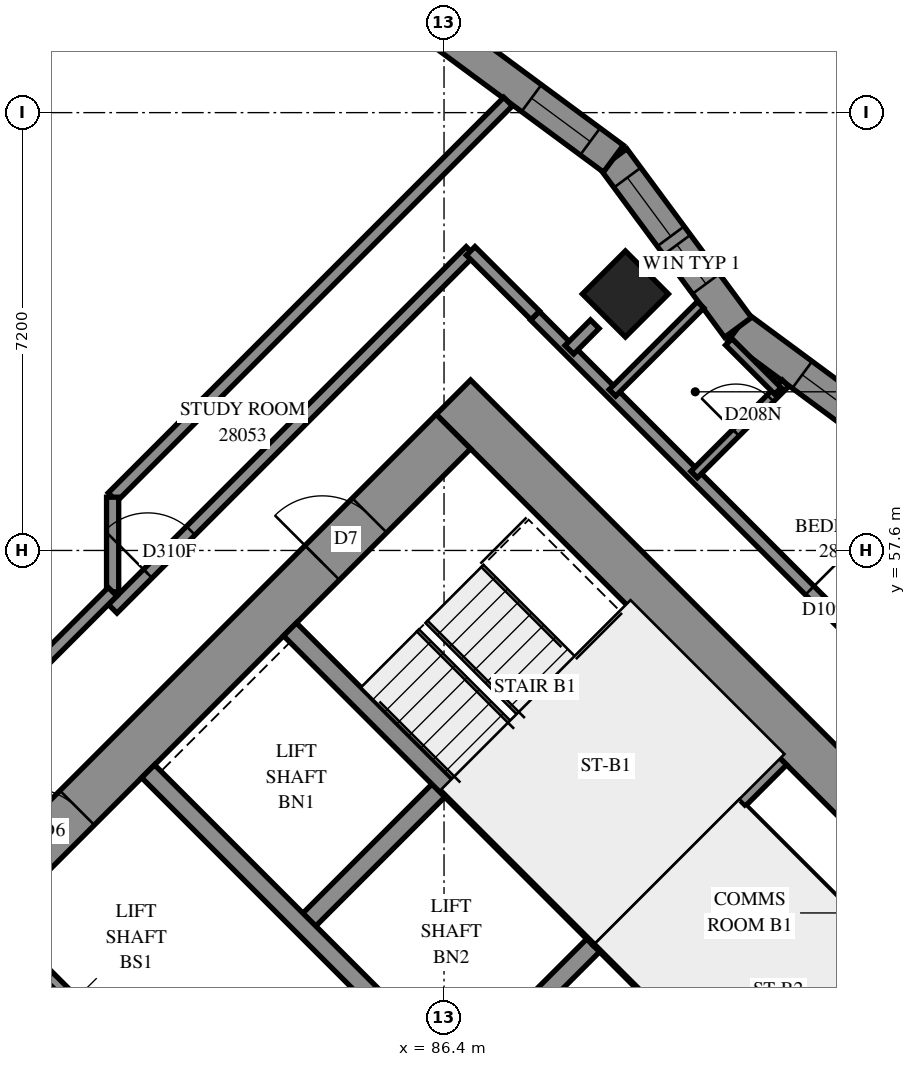
"""IFC4 building model, lengths in metres.
Left out: names, types, materials, properties, quantities, classifications, styles, units other than length and angle.
Written with IfcOpenShell. Run it as: python <this file> out.ifc"""

import sys

from ifc_helpers import new_model, si_unit, direction, frame, frame_2d, origin, origin_2d, place, context, subcontext, project, spatial, polyline, rectangle, outline, extrude, element, fill, save


model = new_model("IFC4")
c1 = context("Model", 3, precision=1e-05, world=origin(), true_north=direction((0.0, 1.0)))
c2 = subcontext(c1, "Body", "Model", "MODEL_VIEW")
j1 = project(units=[si_unit("LENGTHUNIT", "METRE"), si_unit("PLANEANGLEUNIT", "RADIAN")], contexts=[c1])
p1 = place(None, origin())
s1 = spatial("IfcSite", under=j1, at=p1, CompositionType="ELEMENT")
p2 = place(p1, origin())
s2 = spatial("IfcBuilding", under=s1, at=p2, CompositionType="ELEMENT")
p3 = place(p2, frame((0.0, 0.0, 105.0)))
s3 = spatial("IfcBuildingStorey", under=s2, at=p3, CompositionType="ELEMENT", Elevation=105.0)
p4 = place(p3, frame((89.382, 61.818, 0.0), z_axis=(0.0, 0.0, 1.0), x_axis=(0.7071067812, -0.7071067812, 0.0)))
e1 = element("IfcColumn", 1, at=p4, inside=s3, PredefinedType="COLUMN", context=c2, shape_type="SweptSolid", body=[
    extrude(rectangle(XDim=1.0, YDim=1.0, at=origin_2d()), origin(), (0.0, 0.0, 1.0), 3.1),
])
p5 = place(p3, frame((86.554, 60.121, -0.3), z_axis=(0.0, 0.0, 1.0), x_axis=(0.7071067812, -0.7071067812, 0.0)))
e2 = element("IfcWall", 2, at=p5, inside=s3, PredefinedType="SHEAR", context=c2, shape_type="SweptSolid", body=[
    extrude(rectangle(XDim=16.0, YDim=0.8, at=frame_2d((8.0, 0.0))), origin(), (0.0, 0.0, 1.0), 2.7),
])
p6 = place(p5, frame((10.8, 0.0, 0.3)))
e3 = element("IfcOpeningElement", 3, at=p6, cuts=e2, PredefinedType="OPENING", context=c2, shape_type="SweptSolid", body=[
    extrude(rectangle(XDim=0.8, YDim=2.1, at=frame_2d((0.4, 1.05))), frame((0.0, 0.41, 0.0), z_axis=(0.0, -1.0, 0.0), x_axis=(1.0, 0.0, 0.0)), (0.0, 0.0, 1.0), 0.82),
])
p7 = place(p3, frame((76.372, 49.373, -0.3), z_axis=(0.0, 0.0, 1.0), x_axis=(0.7071067812, 0.7071067812, 0.0)))
e4 = element("IfcWall", 4, at=p7, inside=s3, PredefinedType="SHEAR", context=c2, shape_type="SweptSolid", body=[
    extrude(rectangle(XDim=14.4, YDim=0.8, at=frame_2d((7.2, 0.0))), origin(), (0.0, 0.0, 1.0), 2.7),
])
p8 = place(p7, frame((4.55, 0.0, 0.3)))
e5 = element("IfcOpeningElement", 5, at=p8, cuts=e4, PredefinedType="OPENING", context=c2, shape_type="SweptSolid", body=[
    extrude(rectangle(XDim=1.1, YDim=2.1, at=frame_2d((0.55, 1.05))), frame((0.0, 0.41, 0.0), z_axis=(0.0, -1.0, 0.0), x_axis=(1.0, 0.0, 0.0)), (0.0, 0.0, 1.0), 0.82),
])
p9 = place(p7, frame((11.35, 0.0, 0.3)))
e6 = element("IfcOpeningElement", 6, at=p9, cuts=e4, PredefinedType="OPENING", context=c2, shape_type="SweptSolid", body=[
    extrude(rectangle(XDim=1.1, YDim=2.1, at=frame_2d((0.55, 1.05))), frame((0.0, 0.41, 0.0), z_axis=(0.0, -1.0, 0.0), x_axis=(1.0, 0.0, 0.0)), (0.0, 0.0, 1.0), 0.82),
])
p10 = place(p3, frame((84.079, 51.423, 0.0), z_axis=(0.0, 0.0, 1.0), x_axis=(0.7071219326, 0.7070916295, 0.0)))
e7 = element("IfcWall", 7, at=p10, inside=s3, PredefinedType="SOLIDWALL", context=c2, shape_type="SweptSolid", body=[
    extrude(rectangle(XDim=3.3, YDim=0.3, at=frame_2d((1.65, 0.0))), origin(), (0.0, 0.0, 1.0), 3.1),
])
p11 = place(p3, frame((86.625, 48.878, 0.0), z_axis=(0.0, 0.0, 1.0), x_axis=(0.7071067812, 0.7071067812, 0.0)))
e8 = element("IfcWall", 8, at=p11, inside=s3, PredefinedType="SOLIDWALL", context=c2, shape_type="SweptSolid", body=[
    extrude(rectangle(XDim=3.3, YDim=0.3, at=frame_2d((1.65, 0.0))), origin(), (0.0, 0.0, 1.0), 3.1),
])
p12 = place(p3, frame((78.988, 51.423, 0.0), z_axis=(0.0, 0.0, 1.0), x_axis=(0.7071067812, -0.7071067812, 0.0)))
e9 = element("IfcWall", 9, at=p12, inside=s3, PredefinedType="SOLIDWALL", context=c2, shape_type="SweptSolid", body=[
    extrude(rectangle(XDim=14.4, YDim=0.3, at=frame_2d((7.2, 0.0))), origin(), (0.0, 0.0, 1.0), 3.1),
])
p13 = place(p12, frame((1.25, 0.0, 0.0)))
e10 = element("IfcOpeningElement", 10, at=p13, cuts=e9, PredefinedType="OPENING", context=c2, shape_type="SweptSolid", body=[
    extrude(rectangle(XDim=1.1, YDim=2.1, at=frame_2d((0.55, 1.05))), frame((0.0, 0.16, 0.0), z_axis=(0.0, -1.0, 0.0), x_axis=(1.0, 0.0, 0.0)), (0.0, 0.0, 1.0), 0.32),
])
p14 = place(p12, frame((4.85, 0.0, 0.0)))
e11 = element("IfcOpeningElement", 11, at=p14, cuts=e9, PredefinedType="OPENING", context=c2, shape_type="SweptSolid", body=[
    extrude(rectangle(XDim=1.1, YDim=2.1, at=frame_2d((0.55, 1.05))), frame((0.0, 0.16, 0.0), z_axis=(0.0, -1.0, 0.0), x_axis=(1.0, 0.0, 0.0)), (0.0, 0.0, 1.0), 0.32),
])
p15 = place(p12, frame((8.45, 0.0, 0.0)))
e12 = element("IfcOpeningElement", 12, at=p15, cuts=e9, PredefinedType="OPENING", context=c2, shape_type="SweptSolid", body=[
    extrude(rectangle(XDim=1.1, YDim=2.1, at=frame_2d((0.55, 1.05))), frame((0.0, 0.16, 0.0), z_axis=(0.0, -1.0, 0.0), x_axis=(1.0, 0.0, 0.0)), (0.0, 0.0, 1.0), 0.32),
])
p16 = place(p12, frame((12.05, 0.0, 0.0)))
e13 = element("IfcOpeningElement", 13, at=p16, cuts=e9, PredefinedType="OPENING", context=c2, shape_type="SweptSolid", body=[
    extrude(rectangle(XDim=1.1, YDim=2.1, at=frame_2d((0.55, 1.05))), frame((0.0, 0.16, 0.0), z_axis=(0.0, -1.0, 0.0), x_axis=(1.0, 0.0, 0.0)), (0.0, 0.0, 1.0), 0.32),
])
p17 = place(p3, frame((81.534, 53.969, 0.0), z_axis=(0.0, 0.0, 1.0), x_axis=(0.707103309, -0.7071102534, 0.0)))
e14 = element("IfcWall", 14, at=p17, inside=s3, PredefinedType="SOLIDWALL", context=c2, shape_type="SweptSolid", body=[
    extrude(rectangle(XDim=14.4, YDim=0.3, at=frame_2d((7.2, 0.0))), origin(), (0.0, 0.0, 1.0), 3.1),
])
p18 = place(p17, frame((12.05, 0.0, 0.0)))
e15 = element("IfcOpeningElement", 15, at=p18, cuts=e14, PredefinedType="OPENING", context=c2, shape_type="SweptSolid", body=[
    extrude(rectangle(XDim=1.1, YDim=2.1, at=frame_2d((0.55, 1.05))), frame((0.0, 0.16, 0.0), z_axis=(0.0, -1.0, 0.0), x_axis=(1.0, 0.0, 0.0)), (0.0, 0.0, 1.0), 0.32),
])
for number, where, z_axis, x_axis in (
    (16, (83.867, 56.302, 0.0), (0.0, 0.0, 1.0), (0.707, -0.707, 0.0)),
    (17, (88.958, 51.211, 0.0), (0.0, 0.0, 1.0), (0.707, -0.707, 0.0)),
):
    element("IfcWall", number, at=place(p3, frame(where, z_axis=z_axis, x_axis=x_axis)), inside=s3, PredefinedType="SOLIDWALL", context=c2, shape_type="SweptSolid", body=[
        extrude(rectangle(XDim=7.2, YDim=0.3, at=frame_2d((3.6, 0.0))), origin(), (0.0, 0.0, 1.0), 3.1),
    ])
p19 = place(p3, frame((88.958, 51.211, 0.0), z_axis=(0.0, 0.0, 1.0), x_axis=(0.7071067812, 0.7071067812, 0.0)))
e18 = element("IfcWall", 18, at=p19, inside=s3, PredefinedType="SOLIDWALL", context=c2, shape_type="SweptSolid", body=[
    extrude(rectangle(XDim=4.2, YDim=0.3, at=frame_2d((2.1, 0.0))), origin(), (0.0, 0.0, 1.0), 3.1),
])
p20 = place(p3, frame((94.01, 59.218, 0.0), z_axis=(0.0, 0.0, 1.0), x_axis=(-0.8042207234, 0.5943307397, 0.0)))
e19 = element("IfcWall", 19, at=p20, inside=s3, PredefinedType="SOLIDWALL", context=c2, shape_type="SweptSolid", body=[
    extrude(outline(polyline([(-0.041, -0.275), (3.408, -0.275), (3.491, 0.275), (0.041, 0.275), (-0.041, -0.275)])), origin(), (0.0, 0.0, 1.0), 3.1),
])
p21 = place(p20, frame((0.938, 0.0, 0.5)))
e20 = element("IfcOpeningElement", 20, at=p21, cuts=e19, PredefinedType="OPENING", context=c2, shape_type="SweptSolid", body=[
    extrude(rectangle(XDim=1.2, YDim=2.45, at=frame_2d((0.6, 1.225))), frame((0.0, 0.285, 0.0), z_axis=(0.0, -1.0, 0.0), x_axis=(1.0, 0.0, 0.0)), (0.0, 0.0, 1.0), 0.57),
])
p22 = place(p3, frame((91.235, 61.268, 0.0), z_axis=(0.0, 0.0, 1.0), x_axis=(-0.5943168833, 0.8042309632, 0.0)))
e21 = element("IfcWall", 21, at=p22, inside=s3, PredefinedType="SOLIDWALL", context=c2, shape_type="SweptSolid", body=[
    extrude(outline(polyline([(0.041, -0.275), (3.491, -0.275), (3.408, 0.275), (-0.041, 0.275), (0.041, -0.275)])), origin(), (0.0, 0.0, 1.0), 3.1),
])
p23 = place(p22, frame((1.863, 0.0, 0.5)))
e22 = element("IfcOpeningElement", 22, at=p23, cuts=e21, PredefinedType="OPENING", context=c2, shape_type="SweptSolid", body=[
    extrude(rectangle(XDim=1.2, YDim=2.45, at=frame_2d((0.6, 1.225))), frame((0.0, 0.285, 0.0), z_axis=(0.0, -1.0, 0.0), x_axis=(1.0, 0.0, 0.0)), (0.0, 0.0, 1.0), 0.57),
])
p24 = place(p22, frame((0.889, 0.0, 0.45)))
e23 = element("IfcOpeningElement", 23, at=p24, cuts=e21, PredefinedType="OPENING", context=c2, shape_type="SweptSolid", body=[
    extrude(rectangle(XDim=0.8, YDim=2.5, at=frame_2d((0.4, 1.25))), frame((0.0, 0.285, 0.0), z_axis=(0.0, -1.0, 0.0), x_axis=(1.0, 0.0, 0.0)), (0.0, 0.0, 1.0), 0.57),
])
p25 = place(p3, frame((89.185, 64.043, 0.0), z_axis=(0.0, 0.0, 1.0), x_axis=(-0.8042309632, 0.5943168833, 0.0)))
e24 = element("IfcWall", 24, at=p25, inside=s3, PredefinedType="SOLIDWALL", context=c2, shape_type="SweptSolid", body=[
    extrude(outline(polyline([(-0.041, -0.275), (3.408, -0.275), (3.491, 0.275), (0.041, 0.275), (-0.041, -0.275)])), origin(), (0.0, 0.0, 1.0), 3.1),
])
p26 = place(p25, frame((0.475, 0.0, 0.5)))
e25 = element("IfcOpeningElement", 25, at=p26, cuts=e24, PredefinedType="OPENING", context=c2, shape_type="SweptSolid", body=[
    extrude(rectangle(XDim=1.2, YDim=2.45, at=frame_2d((0.6, 1.225))), frame((0.0, 0.285, 0.0), z_axis=(0.0, -1.0, 0.0), x_axis=(1.0, 0.0, 0.0)), (0.0, 0.0, 1.0), 0.57),
])
p27 = place(p3, frame((91.313, 53.354, 0.0), z_axis=(0.0, 0.0, 1.0), x_axis=(0.7071067812, -0.7071067812, 0.0)))
e26 = element("IfcWall", 26, at=p27, inside=s3, PredefinedType="PARTITIONING", context=c2, shape_type="SweptSolid", body=[
    extrude(rectangle(XDim=5.95, YDim=0.15, at=frame_2d((2.975, 0.0))), origin(), (0.0, 0.0, 1.0), 3.1),
])
p28 = place(p3, frame((87.894, 61.461, 0.0), z_axis=(0.0, 0.0, 1.0), x_axis=(0.7071067812, -0.7071067812, 0.0)))
e27 = element("IfcWall", 27, at=p28, inside=s3, PredefinedType="PARTITIONING", context=c2, shape_type="SweptSolid", body=[
    extrude(rectangle(XDim=10.428, YDim=0.2, at=frame_2d((5.214, 0.0))), origin(), (0.0, 0.0, 1.0), 3.1),
])
p29 = place(p28, frame((6.39, 0.0, 0.0)))
e28 = element("IfcOpeningElement", 28, at=p29, cuts=e27, PredefinedType="OPENING", context=c2, shape_type="SweptSolid", body=[
    extrude(rectangle(XDim=0.9, YDim=2.1, at=frame_2d((0.45, 1.05))), frame((0.0, 0.11, 0.0), z_axis=(0.0, -1.0, 0.0), x_axis=(1.0, 0.0, 0.0)), (0.0, 0.0, 1.0), 0.22),
])
p30 = place(p3, frame((80.949, 58.477, 0.0), z_axis=(0.0, 0.0, 1.0), x_axis=(0.7071122172, 0.7071013451, 0.0)))
e29 = element("IfcWall", 29, at=p30, inside=s3, PredefinedType="PARTITIONING", context=c2, shape_type="SweptSolid", body=[
    extrude(rectangle(XDim=9.198, YDim=0.2, at=frame_2d((4.599, 0.0))), origin(), (0.0, 0.0, 1.0), 3.1),
])
p31 = place(p3, frame((80.951, 56.641, 0.0), z_axis=(0.0, 0.0, 1.0), x_axis=(0.7071067812, 0.7071067812, 0.0)))
e30 = element("IfcWall", 30, at=p31, inside=s3, PredefinedType="PARTITIONING", context=c2, shape_type="SweptSolid", body=[
    extrude(rectangle(XDim=8.321, YDim=0.2, at=frame_2d((4.161, 0.0))), origin(), (0.0, 0.0, 1.0), 3.1),
])
p32 = place(p31, frame((0.816, 0.0, 0.0)))
e31 = element("IfcOpeningElement", 31, at=p32, cuts=e30, PredefinedType="OPENING", context=c2, shape_type="SweptSolid", body=[
    extrude(rectangle(XDim=1.0, YDim=2.1, at=frame_2d((0.5, 1.05))), frame((0.0, 0.11, 0.0), z_axis=(0.0, -1.0, 0.0), x_axis=(1.0, 0.0, 0.0)), (0.0, 0.0, 1.0), 0.22),
])
p33 = place(p3, frame((90.513, 58.849, 0.0), z_axis=(0.0, 0.0, 1.0), x_axis=(0.7071303251, 0.7070832365, 0.0)))
e32 = element("IfcWall", 32, at=p33, inside=s3, PredefinedType="PARTITIONING", context=c2, shape_type="SweptSolid", body=[
    extrude(rectangle(XDim=2.124, YDim=0.15, at=frame_2d((1.062, 0.0))), origin(), (0.0, 0.0, 1.0), 3.1),
])
p34 = place(p33, frame((0.972, 0.0, 0.0)))
e33 = element("IfcOpeningElement", 33, at=p34, cuts=e32, PredefinedType="OPENING", context=c2, shape_type="SweptSolid", body=[
    extrude(rectangle(XDim=0.8, YDim=2.1, at=frame_2d((0.4, 1.05))), frame((0.0, 0.085, 0.0), z_axis=(0.0, -1.0, 0.0), x_axis=(1.0, 0.0, 0.0)), (0.0, 0.0, 1.0), 0.17),
])
p35 = place(p3, frame((89.169, 60.193, 0.0), z_axis=(0.0, 0.0, 1.0), x_axis=(0.7076435955, 0.706569559, 0.0)))
e34 = element("IfcWall", 34, at=p35, inside=s3, PredefinedType="PARTITIONING", context=c2, shape_type="SweptSolid", body=[
    extrude(rectangle(XDim=2.048, YDim=0.15, at=frame_2d((1.024, 0.0))), origin(), (0.0, 0.0, 1.0), 3.1),
])
p36 = place(p3, frame((80.95, 56.92, 0.0), z_axis=(0.0, 0.0, 1.0), x_axis=(0.0, 1.0, 0.0)))
e35 = element("IfcWall", 35, at=p36, inside=s3, PredefinedType="PARTITIONING", context=c2, shape_type="SweptSolid", body=[
    extrude(rectangle(XDim=1.556, YDim=0.2, at=frame_2d((0.778, 0.0))), origin(), (0.0, 0.0, 1.0), 3.1),
])
p37 = place(p3, frame((79.879, 55.851, 0.0), z_axis=(0.0, 0.0, 1.0), x_axis=(0.7071067812, 0.7071067812, 0.0)))
e36 = element("IfcWall", 36, at=p37, inside=s3, PredefinedType="PARTITIONING", context=c2, shape_type="SweptSolid", body=[
    extrude(rectangle(XDim=1.513, YDim=0.2, at=frame_2d((0.757, 0.0))), origin(), (0.0, 0.0, 1.0), 3.1),
])
p38 = place(p3, frame((86.838, 62.526, 0.0), z_axis=(0.0, 0.0, 1.0), x_axis=(0.70777292, -0.7064400143, 0.0)))
e37 = element("IfcWall", 37, at=p38, inside=s3, PredefinedType="PARTITIONING", context=c2, shape_type="SweptSolid", body=[
    extrude(rectangle(XDim=1.5, YDim=0.2, at=frame_2d((0.75, 0.0))), origin(), (0.0, 0.0, 1.0), 3.1),
])
p39 = place(p3, frame((91.083, 61.03, 0.0), z_axis=(0.0, 0.0, 1.0), x_axis=(0.7071067812, -0.7071067812, 0.0)))
e38 = element("IfcWall", 38, at=p39, inside=s3, PredefinedType="PARTITIONING", context=c2, shape_type="SweptSolid", body=[
    extrude(rectangle(XDim=1.141, YDim=0.15, at=frame_2d((0.57, 0.0))), origin(), (0.0, 0.0, 1.0), 3.1),
])
p40 = place(p3, frame((88.461, 60.901, 0.0), z_axis=(0.0, 0.0, 1.0), x_axis=(0.7054171665, 0.7087923682, 0.0)))
e39 = element("IfcWall", 39, at=p40, inside=s3, PredefinedType="PARTITIONING", context=c2, shape_type="SweptSolid", body=[
    extrude(rectangle(XDim=0.593, YDim=0.2, at=frame_2d((0.296, 0.0))), origin(), (0.0, 0.0, 1.0), 3.1),
])
p41 = place(p21, origin())
e40 = element("IfcWindow", 40, at=p41, inside=s3, PartitioningType="SINGLE_PANEL", PredefinedType="WINDOW", context=c2, shape_type="SweptSolid", body=[
    extrude(rectangle(XDim=1.2, YDim=2.45, at=frame_2d((0.6, 1.225))), frame((0.0, 0.155, 0.0), z_axis=(0.0, -1.0, 0.0), x_axis=(1.0, 0.0, 0.0)), (0.0, 0.0, 1.0), 0.06),
])
fill(e20, e40)
p42 = place(p23, origin())
e41 = element("IfcWindow", 41, at=p42, inside=s3, PartitioningType="SINGLE_PANEL", PredefinedType="WINDOW", context=c2, shape_type="SweptSolid", body=[
    extrude(rectangle(XDim=1.2, YDim=2.45, at=frame_2d((0.6, 1.225))), frame((0.0, 0.155, 0.0), z_axis=(0.0, -1.0, 0.0), x_axis=(1.0, 0.0, 0.0)), (0.0, 0.0, 1.0), 0.06),
])
fill(e22, e41)
p43 = place(p26, origin())
e42 = element("IfcWindow", 42, at=p43, inside=s3, PartitioningType="SINGLE_PANEL", PredefinedType="WINDOW", context=c2, shape_type="SweptSolid", body=[
    extrude(rectangle(XDim=1.2, YDim=2.45, at=frame_2d((0.6, 1.225))), frame((0.0, 0.155, 0.0), z_axis=(0.0, -1.0, 0.0), x_axis=(1.0, 0.0, 0.0)), (0.0, 0.0, 1.0), 0.06),
])
fill(e25, e42)
p44 = place(p8, origin())
e43 = element("IfcDoor", 43, at=p44, inside=s3, OperationType="DOUBLE_DOOR_SINGLE_SWING", PredefinedType="DOOR", context=c2, shape_type="SweptSolid", body=[
    extrude(rectangle(XDim=1.1, YDim=2.1, at=frame_2d((0.55, 1.05))), frame((0.0, 0.025, 0.0), z_axis=(0.0, -1.0, 0.0), x_axis=(1.0, 0.0, 0.0)), (0.0, 0.0, 1.0), 0.05),
])
fill(e5, e43)
p45 = place(p9, origin())
e44 = element("IfcDoor", 44, at=p45, inside=s3, OperationType="SINGLE_SWING_LEFT", PredefinedType="DOOR", context=c2, shape_type="SweptSolid", body=[
    extrude(rectangle(XDim=1.1, YDim=2.1, at=frame_2d((0.55, 1.05))), frame((0.0, 0.025, 0.0), z_axis=(0.0, -1.0, 0.0), x_axis=(1.0, 0.0, 0.0)), (0.0, 0.0, 1.0), 0.05),
])
fill(e6, e44)
p46 = place(p13, origin())
e45 = element("IfcDoor", 45, at=p46, inside=s3, OperationType="SLIDING_TO_LEFT", PredefinedType="DOOR", context=c2, shape_type="SweptSolid", body=[
    extrude(rectangle(XDim=1.1, YDim=2.1, at=frame_2d((0.55, 1.05))), frame((0.0, 0.025, 0.0), z_axis=(0.0, -1.0, 0.0), x_axis=(1.0, 0.0, 0.0)), (0.0, 0.0, 1.0), 0.05),
])
fill(e10, e45)
p47 = place(p32, origin())
e46 = element("IfcDoor", 46, at=p47, inside=s3, OperationType="SINGLE_SWING_RIGHT", PredefinedType="DOOR", context=c2, shape_type="SweptSolid", body=[
    extrude(rectangle(XDim=1.0, YDim=2.1, at=frame_2d((0.5, 1.05))), frame((0.0, 0.025, 0.0), z_axis=(0.0, -1.0, 0.0), x_axis=(1.0, 0.0, 0.0)), (0.0, 0.0, 1.0), 0.05),
])
fill(e31, e46)
p48 = place(p29, origin())
e47 = element("IfcDoor", 47, at=p48, inside=s3, OperationType="SINGLE_SWING_LEFT", PredefinedType="DOOR", context=c2, shape_type="SweptSolid", body=[
    extrude(rectangle(XDim=0.9, YDim=2.1, at=frame_2d((0.45, 1.05))), frame((0.0, 0.025, 0.0), z_axis=(0.0, -1.0, 0.0), x_axis=(1.0, 0.0, 0.0)), (0.0, 0.0, 1.0), 0.05),
])
fill(e28, e47)
p49 = place(p34, origin())
e48 = element("IfcDoor", 48, at=p49, inside=s3, OperationType="SINGLE_SWING_RIGHT", PredefinedType="DOOR", context=c2, shape_type="SweptSolid", body=[
    extrude(rectangle(XDim=0.8, YDim=2.1, at=frame_2d((0.4, 1.05))), frame((0.0, 0.025, 0.0), z_axis=(0.0, -1.0, 0.0), x_axis=(1.0, 0.0, 0.0)), (0.0, 0.0, 1.0), 0.05),
])
fill(e33, e48)
p50 = place(p24, origin())
e49 = element("IfcWindow", 49, at=p50, inside=s3, PartitioningType="SINGLE_PANEL", PredefinedType="WINDOW", context=c2, shape_type="SweptSolid", body=[
    extrude(rectangle(XDim=0.8, YDim=2.5, at=frame_2d((0.4, 1.25))), frame((0.0, 0.155, 0.0), z_axis=(0.0, -1.0, 0.0), x_axis=(1.0, 0.0, 0.0)), (0.0, 0.0, 1.0), 0.06),
])
fill(e23, e49)
save(model, sys.argv[1])
